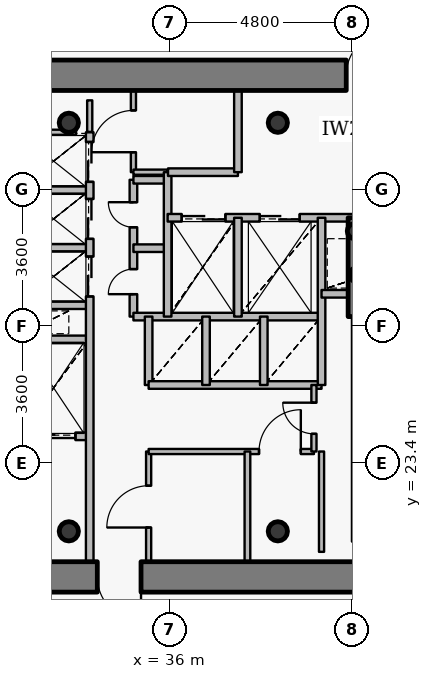
"""IFC4 building model, lengths in metres.
Left out: names, types, materials, properties, quantities, classifications, styles, units other than length and angle.
Written with IfcOpenShell. Run it as: python <this file> out.ifc"""

import sys

from ifc_helpers import new_model, si_unit, direction, frame, frame_2d, origin, origin_2d, place, context, subcontext, project, spatial, rectangle, hollow_circle, extrude, source, transform, mapped, element, fill, save


model = new_model("IFC4")
c1 = context("Model", 3, precision=1e-05, world=origin(), true_north=direction((0.0, 1.0)))
c2 = subcontext(c1, "Body", "Model", "MODEL_VIEW")
j1 = project(units=[si_unit("LENGTHUNIT", "METRE"), si_unit("PLANEANGLEUNIT", "RADIAN")], contexts=[c1])
p1 = place(None, origin())
s1 = spatial("IfcSite", under=j1, at=p1, CompositionType="ELEMENT")
p2 = place(p1, origin())
s2 = spatial("IfcBuilding", under=s1, at=p2, CompositionType="ELEMENT")
p3 = place(p2, frame((0.0, 0.0, 178.65)))
s3 = spatial("IfcBuildingStorey", under=s2, at=p3, CompositionType="ELEMENT", Elevation=178.65)
for number, where, z_axis, x_axis in (
    (1, (33.35, 21.6, 0.0), (0.0, 0.0, 1.0), (1.0, 0.0, 0.0)),
    (2, (38.85, 21.6, 0.0), (0.0, 0.0, 1.0), (1.0, 0.0, 0.0)),
    (3, (38.85, 32.35, 0.0), (0.0, 0.0, 1.0), (1.0, 0.0, 0.0)),
    (4, (33.35, 32.35, 0.0), (0.0, 0.0, 1.0), (1.0, 0.0, 0.0)),
):
    element("IfcColumn", number, at=place(p3, frame(where, z_axis=z_axis, x_axis=x_axis)), inside=s3, PredefinedType="COLUMN", context=c2, shape_type="SweptSolid", body=[
        extrude(hollow_circle(Radius=0.254, WallThickness=0.02, at=origin_2d()), origin(), (0.0, 0.0, 1.0), 3.75),
    ])
for number, where, z_axis, x_axis in (
    (5, (40.95, 28.35, 0.0), (0.0, 0.0, 1.0), (1.0, 0.0, 0.0)),
    (6, (40.88, 29.5, 0.0), (0.0, 0.0, 1.0), (1.0, 0.0, 0.0)),
):
    element("IfcColumn", number, at=place(p3, frame(where, z_axis=z_axis, x_axis=x_axis)), inside=s3, PredefinedType="COLUMN", context=c2, shape_type="SweptSolid", body=[
        extrude(hollow_circle(Radius=0.203, WallThickness=0.016, at=origin_2d()), origin(), (0.0, 0.0, 1.0), 3.75),
    ])
p4 = place(p3, frame((27.2, 33.6, 0.0), z_axis=(0.0, 0.0, 1.0), x_axis=(1.0, 0.0, 0.0)))
e7 = element("IfcWall", 7, at=p4, inside=s3, PredefinedType="SHEAR", context=c2, shape_type="SweptSolid", body=[
    extrude(rectangle(XDim=17.6, YDim=0.8, at=frame_2d((8.8, 0.0))), origin(), (0.0, 0.0, 1.0), 2.95),
])
p5 = place(p4, frame((13.45, 0.0, 0.0)))
e8 = element("IfcOpeningElement", 8, at=p5, cuts=e7, PredefinedType="OPENING", context=c2, shape_type="SweptSolid", body=[
    extrude(rectangle(XDim=1.15, YDim=2.15, at=origin_2d()), frame((0.575, 0.41, 1.075), z_axis=(0.0, -1.0, 0.0), x_axis=(1.0, 0.0, 0.0)), (0.0, 0.0, 1.0), 0.82),
])
p6 = place(p3, frame((44.8, 20.4, 0.0), z_axis=(0.0, 0.0, 1.0), x_axis=(-1.0, 0.0, 0.0)))
e9 = element("IfcWall", 9, at=p6, inside=s3, PredefinedType="SHEAR", context=c2, shape_type="SweptSolid", body=[
    extrude(rectangle(XDim=17.6, YDim=0.8, at=frame_2d((8.8, 0.0))), origin(), (0.0, 0.0, 1.0), 2.95),
])
p7 = place(p6, frame((9.55, 0.0, 0.0)))
e10 = element("IfcOpeningElement", 10, at=p7, cuts=e9, PredefinedType="OPENING", context=c2, shape_type="SweptSolid", body=[
    extrude(rectangle(XDim=1.15, YDim=2.15, at=origin_2d()), frame((0.575, 0.41, 1.075), z_axis=(0.0, -1.0, 0.0), x_axis=(1.0, 0.0, 0.0)), (0.0, 0.0, 1.0), 0.82),
])
p8 = place(p3, frame((40.9, 27.25, 0.0), z_axis=(0.0, 0.0, 1.0), x_axis=(0.0, 1.0, 0.0)))
e11 = element("IfcWall", 11, at=p8, inside=s3, PredefinedType="SHEAR", context=c2, shape_type="SweptSolid", body=[
    extrude(rectangle(XDim=2.6, YDim=0.4, at=frame_2d((1.3, 0.0))), origin(), (0.0, 0.0, 1.0), 3.1),
])
p9 = place(p3, frame((32.0, 24.1, 0.0), z_axis=(0.0, 0.0, 1.0), x_axis=(1.0, 0.0, 0.0)))
e12 = element("IfcWall", 12, at=p9, inside=s3, PredefinedType="PARTITIONING", context=c2, shape_type="SweptSolid", body=[
    extrude(rectangle(XDim=1.9, YDim=0.2, at=frame_2d((0.95, 0.0))), origin(), (0.0, 0.0, 1.0), 3.085),
])
p10 = place(p9, frame((0.375, 0.0, 0.0)))
e13 = element("IfcOpeningElement", 13, at=p10, cuts=e12, PredefinedType="OPENING", context=c2, shape_type="SweptSolid", body=[
    extrude(rectangle(XDim=1.15, YDim=2.15, at=origin_2d()), frame((0.575, 0.11, 1.075), z_axis=(0.0, -1.0, 0.0), x_axis=(1.0, 0.0, 0.0)), (0.0, 0.0, 1.0), 0.22),
])
for number, where, z_axis, x_axis in (
    (14, (32.0, 26.65, 0.0), (0.0, 0.0, 1.0), (1.0, 0.0, 0.0)),
    (15, (32.0, 27.55, 0.0), (0.0, 0.0, 1.0), (1.0, 0.0, 0.0)),
    (16, (32.0, 29.06, 0.0), (0.0, 0.0, 1.0), (1.0, 0.0, 0.0)),
    (17, (32.0, 30.58, 0.0), (0.0, 0.0, 1.0), (1.0, 0.0, 0.0)),
):
    element("IfcWall", number, at=place(p3, frame(where, z_axis=z_axis, x_axis=x_axis)), inside=s3, PredefinedType="PARTITIONING", context=c2, shape_type="SweptSolid", body=[
        extrude(rectangle(XDim=1.9, YDim=0.2, at=frame_2d((0.95, 0.0))), origin(), (0.0, 0.0, 1.0), 3.085),
    ])
p11 = place(p3, frame((33.9, 20.8, 0.0), z_axis=(0.0, 0.0, 1.0), x_axis=(0.0, 1.0, 0.0)))
e18 = element("IfcWall", 18, at=p11, inside=s3, PredefinedType="PARTITIONING", context=c2, shape_type="SweptSolid", body=[
    extrude(rectangle(XDim=11.3, YDim=0.2, at=frame_2d((5.65, 0.0))), origin(), (0.0, 0.0, 1.0), 3.085),
])
p12 = place(p11, frame((6.98, 0.0, 0.0)))
e19 = element("IfcOpeningElement", 19, at=p12, cuts=e18, PredefinedType="OPENING", context=c2, shape_type="SweptSolid", body=[
    extrude(rectangle(XDim=1.05, YDim=2.15, at=origin_2d()), frame((0.525, 0.11, 1.075), z_axis=(0.0, -1.0, 0.0), x_axis=(1.0, 0.0, 0.0)), (0.0, 0.0, 1.0), 0.22),
])
p13 = place(p11, frame((8.495, 0.0, 0.0)))
e20 = element("IfcOpeningElement", 20, at=p13, cuts=e18, PredefinedType="OPENING", context=c2, shape_type="SweptSolid", body=[
    extrude(rectangle(XDim=1.05, YDim=2.15, at=origin_2d()), frame((0.525, 0.11, 1.075), z_axis=(0.0, -1.0, 0.0), x_axis=(1.0, 0.0, 0.0)), (0.0, 0.0, 1.0), 0.22),
])
p14 = place(p11, frame((9.995, 0.0, 0.0)))
e21 = element("IfcOpeningElement", 21, at=p14, cuts=e18, PredefinedType="OPENING", context=c2, shape_type="SweptSolid", body=[
    extrude(rectangle(XDim=1.05, YDim=2.15, at=origin_2d()), frame((0.525, 0.11, 1.075), z_axis=(0.0, -1.0, 0.0), x_axis=(1.0, 0.0, 0.0)), (0.0, 0.0, 1.0), 0.22),
])
p15 = place(p3, frame((35.05, 27.25, 0.0), z_axis=(0.0, 0.0, 1.0), x_axis=(0.0, 1.0, 0.0)))
e22 = element("IfcWall", 22, at=p15, inside=s3, PredefinedType="PARTITIONING", context=c2, shape_type="SweptSolid", body=[
    extrude(rectangle(XDim=3.6, YDim=0.2, at=frame_2d((1.8, 0.0))), origin(), (0.0, 0.0, 1.0), 3.5),
])
p16 = place(p15, frame((0.59, 0.0, 0.0)))
e23 = element("IfcOpeningElement", 23, at=p16, cuts=e22, PredefinedType="OPENING", context=c2, shape_type="SweptSolid", body=[
    extrude(rectangle(XDim=0.66, YDim=2.05, at=origin_2d()), frame((0.33, 0.11, 1.025), z_axis=(0.0, -1.0, 0.0), x_axis=(1.0, 0.0, 0.0)), (0.0, 0.0, 1.0), 0.22),
])
p17 = place(p15, frame((2.35, 0.0, 0.0)))
e24 = element("IfcOpeningElement", 24, at=p17, cuts=e22, PredefinedType="OPENING", context=c2, shape_type="SweptSolid", body=[
    extrude(rectangle(XDim=0.66, YDim=2.05, at=origin_2d()), frame((0.33, 0.11, 1.025), z_axis=(0.0, -1.0, 0.0), x_axis=(1.0, 0.0, 0.0)), (0.0, 0.0, 1.0), 0.22),
])
p18 = place(p3, frame((35.05, 27.25, 0.0), z_axis=(0.0, 0.0, 1.0), x_axis=(1.0, 0.0, 0.0)))
e25 = element("IfcWall", 25, at=p18, inside=s3, PredefinedType="PARTITIONING", context=c2, shape_type="SweptSolid", body=[
    extrude(rectangle(XDim=4.95, YDim=0.2, at=frame_2d((2.475, 0.0))), origin(), (0.0, 0.0, 1.0), 3.085),
])
for number, where, z_axis, x_axis in (
    (26, (35.05, 29.05, 0.0), (0.0, 0.0, 1.0), (1.0, 0.0, 0.0)),
    (27, (35.05, 30.85, 0.0), (0.0, 0.0, 1.0), (1.0, 0.0, 0.0)),
):
    element("IfcWall", number, at=place(p3, frame(where, z_axis=z_axis, x_axis=x_axis)), inside=s3, PredefinedType="PARTITIONING", context=c2, shape_type="SweptSolid", body=[
        extrude(rectangle(XDim=0.9, YDim=0.2, at=frame_2d((0.45, 0.0))), origin(), (0.0, 0.0, 1.0), 3.5),
    ])
p19 = place(p3, frame((35.05, 31.05, 0.0), z_axis=(0.0, 0.0, 1.0), x_axis=(0.0, 1.0, 0.0)))
e28 = element("IfcWall", 28, at=p19, inside=s3, PredefinedType="PARTITIONING", context=c2, shape_type="SweptSolid", body=[
    extrude(rectangle(XDim=2.15, YDim=0.135, at=frame_2d((1.075, 0.0))), origin(), (0.0, 0.0, 1.0), 3.085),
])
p20 = place(p19, frame((0.525, 0.0, 0.0)))
e29 = element("IfcOpeningElement", 29, at=p20, cuts=e28, PredefinedType="OPENING", context=c2, shape_type="SweptSolid", body=[
    extrude(rectangle(XDim=1.1, YDim=2.15, at=origin_2d()), frame((0.55, 0.078, 1.075), z_axis=(0.0, -1.0, 0.0), x_axis=(1.0, 0.0, 0.0)), (0.0, 0.0, 1.0), 0.155),
])
p21 = place(p3, frame((35.05, 31.05, 0.0), z_axis=(0.0, 0.0, 1.0), x_axis=(1.0, 0.0, 0.0)))
e30 = element("IfcWall", 30, at=p21, inside=s3, PredefinedType="PARTITIONING", context=c2, shape_type="SweptSolid", body=[
    extrude(rectangle(XDim=0.9, YDim=0.135, at=frame_2d((0.45, 0.0))), origin(), (0.0, 0.0, 1.0), 3.5),
])
p22 = place(p3, frame((35.45, 20.8, 0.0), z_axis=(0.0, 0.0, 1.0), x_axis=(0.0, 1.0, 0.0)))
e31 = element("IfcWall", 31, at=p22, inside=s3, PredefinedType="PARTITIONING", context=c2, shape_type="SweptSolid", body=[
    extrude(rectangle(XDim=2.9, YDim=0.135, at=frame_2d((1.45, 0.0))), origin(), (0.0, 0.0, 1.0), 3.085),
])
p23 = place(p22, frame((0.9, 0.0, 0.0)))
e32 = element("IfcOpeningElement", 32, at=p23, cuts=e31, PredefinedType="OPENING", context=c2, shape_type="SweptSolid", body=[
    extrude(rectangle(XDim=1.1, YDim=2.15, at=origin_2d()), frame((0.55, 0.078, 1.075), z_axis=(0.0, -1.0, 0.0), x_axis=(1.0, 0.0, 0.0)), (0.0, 0.0, 1.0), 0.155),
])
p24 = place(p3, frame((35.45, 23.7, 0.0), z_axis=(0.0, 0.0, 1.0), x_axis=(1.0, 0.0, 0.0)))
e33 = element("IfcWall", 33, at=p24, inside=s3, PredefinedType="PARTITIONING", context=c2, shape_type="SweptSolid", body=[
    extrude(rectangle(XDim=4.35, YDim=0.135, at=frame_2d((2.175, 0.0))), origin(), (0.0, 0.0, 1.0), 3.085),
])
p25 = place(p24, frame((2.905, 0.0, 0.0)))
e34 = element("IfcOpeningElement", 34, at=p25, cuts=e33, PredefinedType="OPENING", context=c2, shape_type="SweptSolid", body=[
    extrude(rectangle(XDim=1.1, YDim=2.15, at=origin_2d()), frame((0.55, 0.078, 1.075), z_axis=(0.0, -1.0, 0.0), x_axis=(1.0, 0.0, 0.0)), (0.0, 0.0, 1.0), 0.155),
])
p26 = place(p3, frame((35.45, 25.45, 0.0), z_axis=(0.0, 0.0, 1.0), x_axis=(0.0, 1.0, 0.0)))
e35 = element("IfcWall", 35, at=p26, inside=s3, PredefinedType="PARTITIONING", context=c2, shape_type="SweptSolid", body=[
    extrude(rectangle(XDim=1.8, YDim=0.2, at=frame_2d((0.9, 0.0))), origin(), (0.0, 0.0, 1.0), 3.5),
])
p27 = place(p3, frame((35.45, 25.45, 0.0), z_axis=(0.0, 0.0, 1.0), x_axis=(1.0, 0.0, 0.0)))
e36 = element("IfcWall", 36, at=p27, inside=s3, PredefinedType="PARTITIONING", context=c2, shape_type="SweptSolid", body=[
    extrude(rectangle(XDim=4.55, YDim=0.2, at=frame_2d((2.275, 0.0))), origin(), (0.0, 0.0, 1.0), 3.085),
])
p28 = place(p3, frame((35.95, 27.25, 0.0), z_axis=(0.0, 0.0, 1.0), x_axis=(0.0, 1.0, 0.0)))
e37 = element("IfcWall", 37, at=p28, inside=s3, PredefinedType="PARTITIONING", context=c2, shape_type="SweptSolid", body=[
    extrude(rectangle(XDim=3.8, YDim=0.2, at=frame_2d((1.9, 0.0))), origin(), (0.0, 0.0, 1.0), 3.5),
])
p29 = place(p3, frame((35.95, 29.85, 0.0), z_axis=(0.0, 0.0, 1.0), x_axis=(1.0, 0.0, 0.0)))
e38 = element("IfcWall", 38, at=p29, inside=s3, PredefinedType="PARTITIONING", context=c2, shape_type="SweptSolid", body=[
    extrude(rectangle(XDim=8.49, YDim=0.2, at=frame_2d((4.245, 0.0))), origin(), (0.0, 0.0, 1.0), 3.085),
])
p30 = place(p29, frame((6.1, 0.0, 0.0)))
e39 = element("IfcOpeningElement", 39, at=p30, cuts=e38, PredefinedType="OPENING", context=c2, shape_type="SweptSolid", body=[
    extrude(rectangle(XDim=1.2, YDim=2.15, at=origin_2d()), frame((0.6, 0.11, 1.075), z_axis=(0.0, -1.0, 0.0), x_axis=(1.0, 0.0, 0.0)), (0.0, 0.0, 1.0), 0.22),
])
p31 = place(p29, frame((0.37, 0.0, 0.0)))
e40 = element("IfcOpeningElement", 40, at=p31, cuts=e38, PredefinedType="OPENING", context=c2, shape_type="SweptSolid", body=[
    extrude(rectangle(XDim=1.15, YDim=2.15, at=origin_2d()), frame((0.575, 0.11, 1.075), z_axis=(0.0, -1.0, 0.0), x_axis=(1.0, 0.0, 0.0)), (0.0, 0.0, 1.0), 0.22),
])
p32 = place(p29, frame((2.425, 0.0, 0.0)))
e41 = element("IfcOpeningElement", 41, at=p32, cuts=e38, PredefinedType="OPENING", context=c2, shape_type="SweptSolid", body=[
    extrude(rectangle(XDim=1.05, YDim=2.15, at=origin_2d()), frame((0.525, 0.11, 1.075), z_axis=(0.0, -1.0, 0.0), x_axis=(1.0, 0.0, 0.0)), (0.0, 0.0, 1.0), 0.22),
])
p33 = place(p3, frame((35.96, 31.05, 0.0), z_axis=(0.0, 0.0, 1.0), x_axis=(1.0, 0.0, 0.0)))
e42 = element("IfcWall", 42, at=p33, inside=s3, PredefinedType="PARTITIONING", context=c2, shape_type="SweptSolid", body=[
    extrude(rectangle(XDim=1.84, YDim=0.2, at=frame_2d((0.92, 0.0))), origin(), (0.0, 0.0, 1.0), 3.5),
])
p34 = place(p3, frame((36.96, 25.45, 0.0), z_axis=(0.0, 0.0, 1.0), x_axis=(0.0, 1.0, 0.0)))
e43 = element("IfcWall", 43, at=p34, inside=s3, PredefinedType="PARTITIONING", context=c2, shape_type="SweptSolid", body=[
    extrude(rectangle(XDim=1.8, YDim=0.2, at=frame_2d((0.9, 0.0))), origin(), (0.0, 0.0, 1.0), 3.5),
])
p35 = place(p3, frame((37.8, 27.25, 0.0), z_axis=(0.0, 0.0, 1.0), x_axis=(0.0, 1.0, 0.0)))
e44 = element("IfcWall", 44, at=p35, inside=s3, PredefinedType="PARTITIONING", context=c2, shape_type="SweptSolid", body=[
    extrude(rectangle(XDim=2.6, YDim=0.2, at=frame_2d((1.3, 0.0))), origin(), (0.0, 0.0, 1.0), 3.5),
])
p36 = place(p3, frame((37.8, 31.05, 0.0), z_axis=(0.0, 0.0, 1.0), x_axis=(0.0, 1.0, 0.0)))
e45 = element("IfcWall", 45, at=p36, inside=s3, PredefinedType="PARTITIONING", context=c2, shape_type="SweptSolid", body=[
    extrude(rectangle(XDim=2.15, YDim=0.2, at=frame_2d((1.075, 0.0))), origin(), (0.0, 0.0, 1.0), 3.085),
])
p37 = place(p3, frame((38.05, 20.18, 0.0), z_axis=(0.0, 0.0, 1.0), x_axis=(0.0, 1.0, 0.0)))
e46 = element("IfcWall", 46, at=p37, inside=s3, PredefinedType="PARTITIONING", context=c2, shape_type="SweptSolid", body=[
    extrude(rectangle(XDim=3.52, YDim=0.15, at=frame_2d((1.76, 0.0))), origin(), (0.0, 0.0, 1.0), 2.935),
])
p38 = place(p3, frame((38.48, 25.45, 0.0), z_axis=(0.0, 0.0, 1.0), x_axis=(0.0, 1.0, 0.0)))
e47 = element("IfcWall", 47, at=p38, inside=s3, PredefinedType="PARTITIONING", context=c2, shape_type="SweptSolid", body=[
    extrude(rectangle(XDim=1.8, YDim=0.2, at=frame_2d((0.9, 0.0))), origin(), (0.0, 0.0, 1.0), 3.5),
])
p39 = place(p3, frame((39.8, 23.7, 0.0), z_axis=(0.0, 0.0, 1.0), x_axis=(0.0, 1.0, 0.0)))
e48 = element("IfcWall", 48, at=p39, inside=s3, PredefinedType="PARTITIONING", context=c2, shape_type="SweptSolid", body=[
    extrude(rectangle(XDim=1.75, YDim=0.135, at=frame_2d((0.875, 0.0))), origin(), (0.0, 0.0, 1.0), 3.5),
])
p40 = place(p39, frame((0.465, 0.0, 0.0)))
e49 = element("IfcOpeningElement", 49, at=p40, cuts=e48, PredefinedType="OPENING", context=c2, shape_type="SweptSolid", body=[
    extrude(rectangle(XDim=0.82, YDim=2.1, at=origin_2d()), frame((0.41, 0.078, 1.05), z_axis=(0.0, -1.0, 0.0), x_axis=(1.0, 0.0, 0.0)), (0.0, 0.0, 1.0), 0.155),
])
p41 = place(p3, frame((40.0, 25.45, 0.0), z_axis=(0.0, 0.0, 1.0), x_axis=(0.0, 1.0, 0.0)))
e50 = element("IfcWall", 50, at=p41, inside=s3, PredefinedType="PARTITIONING", context=c2, shape_type="SweptSolid", body=[
    extrude(rectangle(XDim=4.4, YDim=0.2, at=frame_2d((2.2, 0.0))), origin(), (0.0, 0.0, 1.0), 3.5),
])
p42 = place(p3, frame((40.0, 27.85, 0.0), z_axis=(0.0, 0.0, 1.0), x_axis=(1.0, 0.0, 0.0)))
e51 = element("IfcWall", 51, at=p42, inside=s3, PredefinedType="PARTITIONING", context=c2, shape_type="SweptSolid", body=[
    extrude(rectangle(XDim=0.9, YDim=0.2, at=frame_2d((0.45, 0.0))), origin(), (0.0, 0.0, 1.0), 3.5),
])
p43 = place(p3, frame((40.9, 21.33, 0.0), z_axis=(0.0, 0.0, 1.0), x_axis=(0.0, 1.0, 0.0)))
e52 = element("IfcWall", 52, at=p43, inside=s3, PredefinedType="PARTITIONING", context=c2, shape_type="SweptSolid", body=[
    extrude(rectangle(XDim=5.91, YDim=0.2, at=frame_2d((2.955, 0.0))), origin(), (0.0, 0.0, 1.0), 3.035),
])
p44 = place(p3, frame((32.36, 32.1, 0.0), z_axis=(0.0, 0.0, 1.0), x_axis=(1.0, 0.0, 0.0)))
e53 = element("IfcWall", 53, at=p44, inside=s3, PredefinedType="PARTITIONING", context=c2, shape_type="SweptSolid", body=[
    extrude(rectangle(XDim=1.18, YDim=0.135, at=frame_2d((0.59, 0.0))), origin(), (0.0, 0.0, 1.0), 3.085),
])
p45 = place(p3, frame((40.0, 23.7, 0.0), z_axis=(0.0, 0.0, 1.0), x_axis=(0.0, -1.0, 0.0)))
e54 = element("IfcWall", 54, at=p45, inside=s3, PredefinedType="PARTITIONING", context=c2, shape_type="SweptSolid", body=[
    extrude(rectangle(XDim=2.64, YDim=0.135, at=frame_2d((1.32, 0.0))), origin(), (0.0, 0.0, 1.0), 3.035),
])
p46 = place(p3, frame((33.9, 32.11, 0.0), z_axis=(0.0, 0.0, 1.0), x_axis=(0.0, 1.0, 0.0)))
e55 = element("IfcWall", 55, at=p46, inside=s3, PredefinedType="PARTITIONING", context=c2, shape_type="SweptSolid", body=[
    extrude(rectangle(XDim=0.83, YDim=0.135, at=frame_2d((0.415, 0.0))), origin(), (0.0, 0.0, 1.0), 3.085),
])
m1 = source(origin(), c2, "Body", "SweptSolid", [
    extrude(rectangle(XDim=1.15, YDim=2.15, at=origin_2d()), frame((0.575, 0.025, 1.075), z_axis=(0.0, -1.0, 0.0), x_axis=(1.0, 0.0, 0.0)), (0.0, 0.0, 1.0), 0.05),
])
p47 = place(p5, origin())
e56 = element("IfcDoor", 56, at=p47, inside=s3, OperationType="SINGLE_SWING_RIGHT", PredefinedType="DOOR", context=c2, shape_type="MappedRepresentation", body=[
    mapped(m1, transform((0.0, 0.0, 0.0), x_axis=(1.0, 0.0, 0.0), y_axis=(0.0, 1.0, 0.0), z_axis=(0.0, 0.0, 1.0), scale=1.0)),
])
fill(e8, e56)
p48 = place(p7, origin())
e57 = element("IfcDoor", 57, at=p48, inside=s3, OperationType="SINGLE_SWING_LEFT", PredefinedType="DOOR", context=c2, shape_type="MappedRepresentation", body=[
    mapped(m1, transform((0.0, 0.0, 0.0), x_axis=(1.0, 0.0, 0.0), y_axis=(0.0, 1.0, 0.0), z_axis=(0.0, 0.0, 1.0), scale=1.0)),
])
fill(e10, e57)
m2 = source(origin(), c2, "Body", "SweptSolid", [
    extrude(rectangle(XDim=1.15, YDim=2.15, at=origin_2d()), frame((0.575, 0.025, 1.075), z_axis=(0.0, -1.0, 0.0), x_axis=(1.0, 0.0, 0.0)), (0.0, 0.0, 1.0), 0.05),
])
p49 = place(p31, origin())
e58 = element("IfcDoor", 58, at=p49, inside=s3, OperationType="DOUBLE_DOOR_SLIDING", PredefinedType="USERDEFINED", context=c2, shape_type="MappedRepresentation", body=[
    mapped(m2, transform((0.0, 0.0, 0.0), x_axis=(1.0, 0.0, 0.0), y_axis=(0.0, 1.0, 0.0), z_axis=(0.0, 0.0, 1.0), scale=1.0)),
])
fill(e40, e58)
p50 = place(p10, origin())
e59 = element("IfcDoor", 59, at=p50, inside=s3, OperationType="DOUBLE_DOOR_SLIDING", PredefinedType="USERDEFINED", context=c2, shape_type="MappedRepresentation", body=[
    mapped(m2, transform((0.0, 0.0, 0.0), x_axis=(1.0, 0.0, 0.0), y_axis=(0.0, 1.0, 0.0), z_axis=(0.0, 0.0, 1.0), scale=1.0)),
])
fill(e13, e59)
m3 = source(origin(), c2, "Body", "SweptSolid", [
    extrude(rectangle(XDim=1.05, YDim=2.15, at=origin_2d()), frame((0.525, 0.025, 1.075), z_axis=(0.0, -1.0, 0.0), x_axis=(1.0, 0.0, 0.0)), (0.0, 0.0, 1.0), 0.05),
])
p51 = place(p32, origin())
e60 = element("IfcDoor", 60, at=p51, inside=s3, OperationType="DOUBLE_DOOR_SLIDING", PredefinedType="USERDEFINED", context=c2, shape_type="MappedRepresentation", body=[
    mapped(m3, transform((0.0, 0.0, 0.0), x_axis=(1.0, 0.0, 0.0), y_axis=(0.0, 1.0, 0.0), z_axis=(0.0, 0.0, 1.0), scale=1.0)),
])
fill(e41, e60)
p52 = place(p12, origin())
e61 = element("IfcDoor", 61, at=p52, inside=s3, OperationType="DOUBLE_DOOR_SLIDING", PredefinedType="USERDEFINED", context=c2, shape_type="MappedRepresentation", body=[
    mapped(m3, transform((0.0, 0.0, 0.0), x_axis=(1.0, 0.0, 0.0), y_axis=(0.0, 1.0, 0.0), z_axis=(0.0, 0.0, 1.0), scale=1.0)),
])
fill(e19, e61)
p53 = place(p13, origin())
e62 = element("IfcDoor", 62, at=p53, inside=s3, OperationType="DOUBLE_DOOR_SLIDING", PredefinedType="USERDEFINED", context=c2, shape_type="MappedRepresentation", body=[
    mapped(m3, transform((0.0, 0.0, 0.0), x_axis=(1.0, 0.0, 0.0), y_axis=(0.0, 1.0, 0.0), z_axis=(0.0, 0.0, 1.0), scale=1.0)),
])
fill(e20, e62)
p54 = place(p14, origin())
e63 = element("IfcDoor", 63, at=p54, inside=s3, OperationType="DOUBLE_DOOR_SLIDING", PredefinedType="USERDEFINED", context=c2, shape_type="MappedRepresentation", body=[
    mapped(m3, transform((0.0, 0.0, 0.0), x_axis=(1.0, 0.0, 0.0), y_axis=(0.0, 1.0, 0.0), z_axis=(0.0, 0.0, 1.0), scale=1.0)),
])
fill(e21, e63)
m4 = source(origin(), c2, "Body", "SweptSolid", [
    extrude(rectangle(XDim=0.66, YDim=2.05, at=origin_2d()), frame((0.33, 0.025, 1.025), z_axis=(0.0, -1.0, 0.0), x_axis=(1.0, 0.0, 0.0)), (0.0, 0.0, 1.0), 0.05),
])
p55 = place(p16, origin())
e64 = element("IfcDoor", 64, at=p55, inside=s3, OperationType="SINGLE_SWING_LEFT", PredefinedType="USERDEFINED", context=c2, shape_type="MappedRepresentation", body=[
    mapped(m4, transform((0.0, 0.0, 0.0), x_axis=(1.0, 0.0, 0.0), y_axis=(0.0, 1.0, 0.0), z_axis=(0.0, 0.0, 1.0), scale=1.0)),
])
fill(e23, e64)
p56 = place(p17, origin())
e65 = element("IfcDoor", 65, at=p56, inside=s3, OperationType="SINGLE_SWING_RIGHT", PredefinedType="USERDEFINED", context=c2, shape_type="MappedRepresentation", body=[
    mapped(m4, transform((0.0, 0.0, 0.0), x_axis=(1.0, 0.0, 0.0), y_axis=(0.0, 1.0, 0.0), z_axis=(0.0, 0.0, 1.0), scale=1.0)),
])
fill(e24, e65)
m5 = source(origin(), c2, "Body", "SweptSolid", [
    extrude(rectangle(XDim=1.1, YDim=2.15, at=origin_2d()), frame((0.55, 0.025, 1.075), z_axis=(0.0, -1.0, 0.0), x_axis=(1.0, 0.0, 0.0)), (0.0, 0.0, 1.0), 0.05),
])
p57 = place(p23, origin())
e66 = element("IfcDoor", 66, at=p57, inside=s3, OperationType="SINGLE_SWING_LEFT", PredefinedType="DOOR", context=c2, shape_type="MappedRepresentation", body=[
    mapped(m5, transform((0.0, 0.0, 0.0), x_axis=(1.0, 0.0, 0.0), y_axis=(0.0, 1.0, 0.0), z_axis=(0.0, 0.0, 1.0), scale=1.0)),
])
fill(e32, e66)
p58 = place(p25, origin())
e67 = element("IfcDoor", 67, at=p58, inside=s3, OperationType="SINGLE_SWING_RIGHT", PredefinedType="DOOR", context=c2, shape_type="MappedRepresentation", body=[
    mapped(m5, transform((0.0, 0.0, 0.0), x_axis=(1.0, 0.0, 0.0), y_axis=(0.0, 1.0, 0.0), z_axis=(0.0, 0.0, 1.0), scale=1.0)),
])
fill(e34, e67)
p59 = place(p20, origin())
e68 = element("IfcDoor", 68, at=p59, inside=s3, OperationType="SINGLE_SWING_LEFT", PredefinedType="DOOR", context=c2, shape_type="MappedRepresentation", body=[
    mapped(m5, transform((0.0, 0.0, 0.0), x_axis=(1.0, 0.0, 0.0), y_axis=(0.0, 1.0, 0.0), z_axis=(0.0, 0.0, 1.0), scale=1.0)),
])
fill(e29, e68)
m6 = source(origin(), c2, "Body", "SweptSolid", [
    extrude(rectangle(XDim=0.82, YDim=2.1, at=origin_2d()), frame((0.41, 0.025, 1.05), z_axis=(0.0, -1.0, 0.0), x_axis=(1.0, 0.0, 0.0)), (0.0, 0.0, 1.0), 0.05),
])
p60 = place(p40, origin())
e69 = element("IfcDoor", 69, at=p60, inside=s3, OperationType="SINGLE_SWING_RIGHT", PredefinedType="DOOR", context=c2, shape_type="MappedRepresentation", body=[
    mapped(m6, transform((0.0, 0.0, 0.0), x_axis=(1.0, 0.0, 0.0), y_axis=(0.0, 1.0, 0.0), z_axis=(0.0, 0.0, 1.0), scale=1.0)),
])
fill(e49, e69)
save(model, sys.argv[1])
